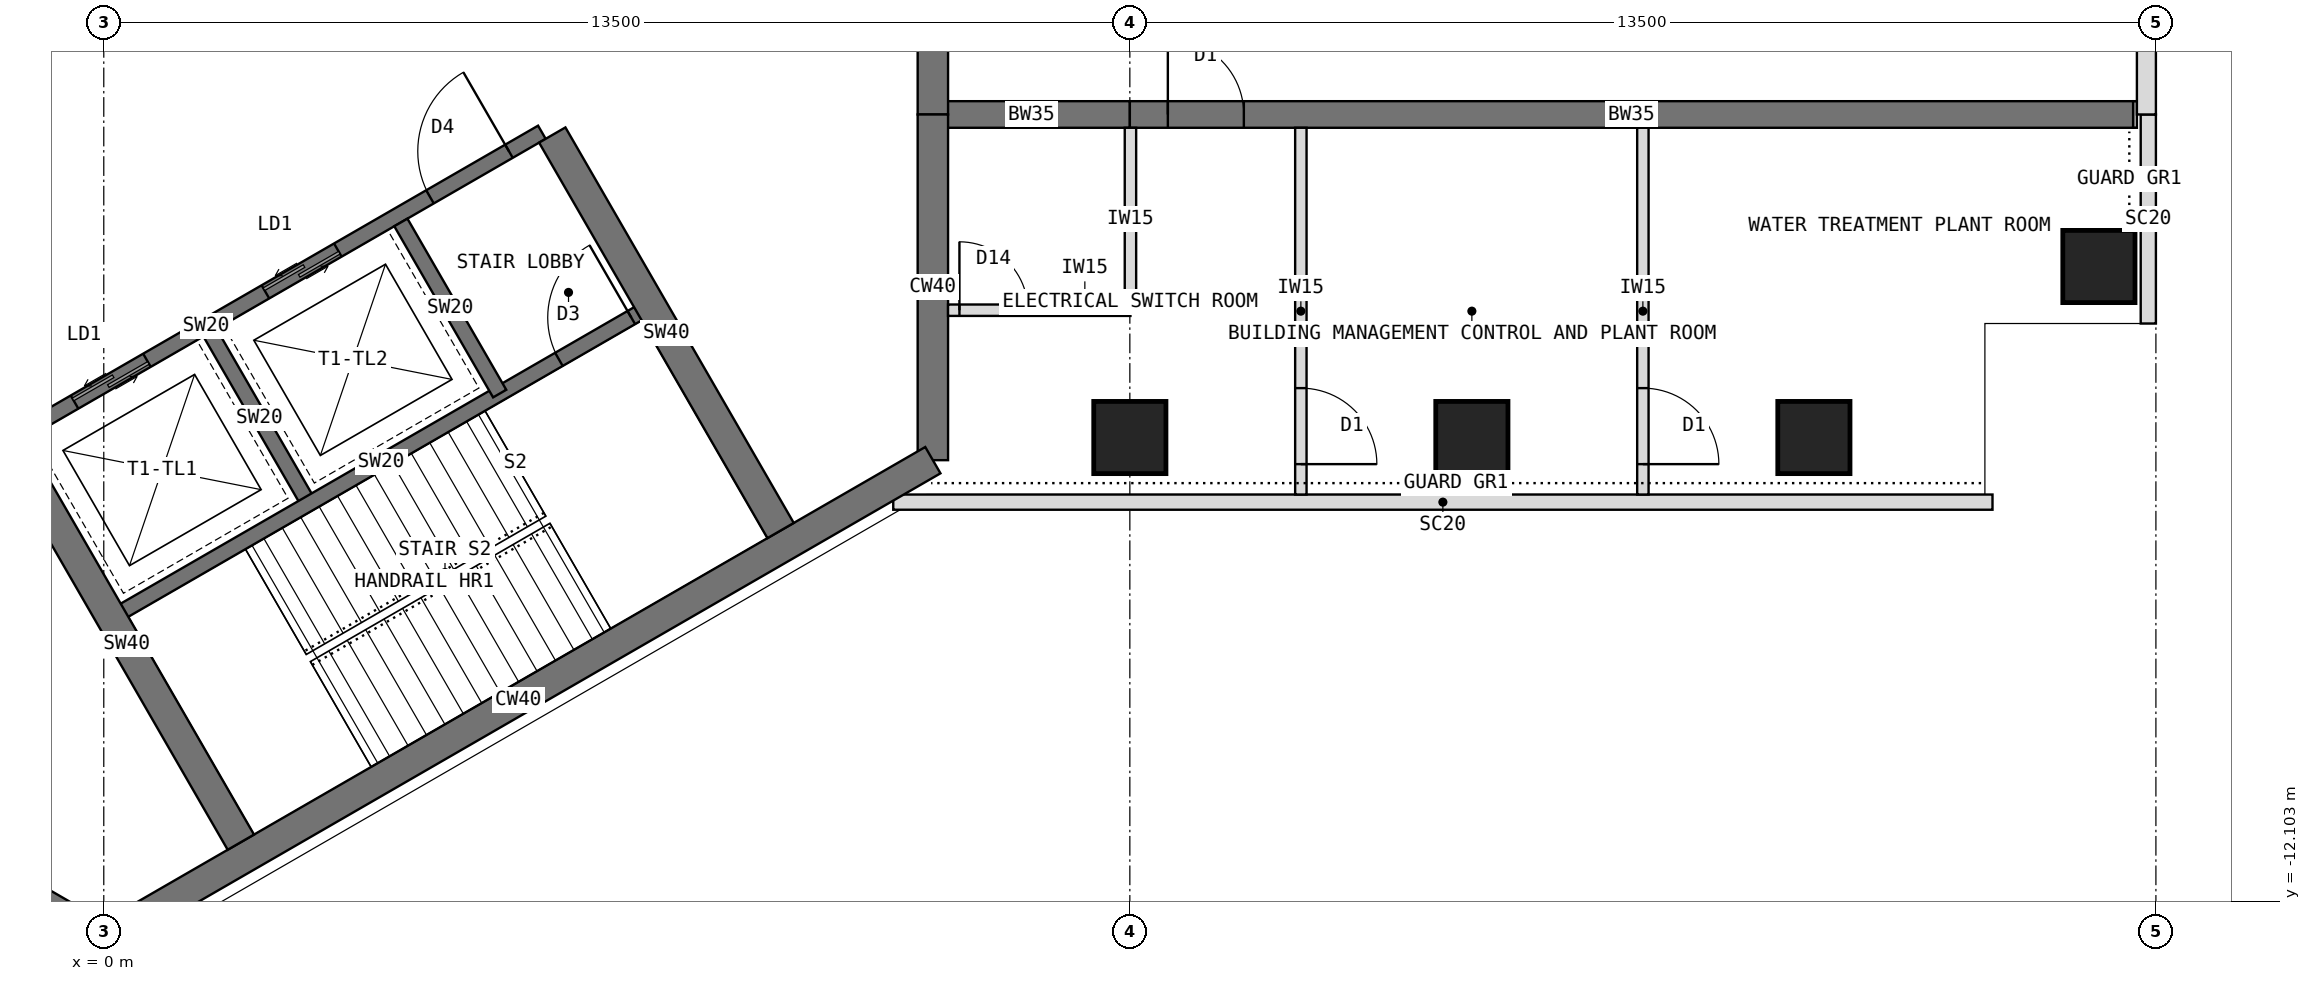
"""IFC4 building model, lengths in metres.
Left out: names, types, materials, properties, quantities, classifications, styles, units other than length and angle.
Written with IfcOpenShell. Run it as: python <this file> out.ifc"""

import sys

from ifc_helpers import new_model, si_unit, direction, frame, frame_2d, origin, origin_2d, place, context, subcontext, project, spatial, rectangle, extrude, element, fill, save


model = new_model("IFC4")
c1 = context("Model", 3, precision=1e-05, world=origin(), true_north=direction((0.0, 1.0)))
c2 = subcontext(c1, "Body", "Model", "MODEL_VIEW")
j1 = project(units=[si_unit("LENGTHUNIT", "METRE"), si_unit("PLANEANGLEUNIT", "RADIAN")], contexts=[c1])
p1 = place(None, origin())
s1 = spatial("IfcSite", under=j1, at=p1, CompositionType="ELEMENT")
p2 = place(p1, origin())
s2 = spatial("IfcBuilding", under=s1, at=p2, CompositionType="ELEMENT")
p3 = place(p2, frame((0.0, 0.0, 291.5)))
s3 = spatial("IfcBuildingStorey", under=s2, at=p3, CompositionType="ELEMENT", Elevation=291.5)
p4 = place(p3, frame((10.908, -6.298, 0.0), z_axis=(0.0, 0.0, 1.0), x_axis=(0.0, 1.0, 0.0)))
e1 = element("IfcWall", 1, at=p4, inside=s3, PredefinedType="SHEAR", context=c2, shape_type="SweptSolid", body=[
    extrude(rectangle(XDim=4.548, YDim=0.4, at=frame_2d((2.274, 0.0))), origin(), (0.0, 0.0, 1.0), 4.55),
])
p5 = place(p3, frame((10.908, -1.75, 0.0), z_axis=(0.0, 0.0, 1.0), x_axis=(0.0, 1.0, 0.0)))
e2 = element("IfcWall", 2, at=p5, inside=s3, PredefinedType="SHEAR", context=c2, shape_type="SweptSolid", body=[
    extrude(rectangle(XDim=3.5, YDim=0.4, at=frame_2d((1.75, 0.0))), origin(), (0.0, 0.0, 1.0), 4.55),
])
p6 = place(p5, frame((0.85, 0.0, 0.0)))
e3 = element("IfcOpeningElement", 3, at=p6, cuts=e2, PredefinedType="OPENING", context=c2, shape_type="SweptSolid", body=[
    extrude(rectangle(XDim=1.8, YDim=2.1, at=frame_2d((0.9, 1.05))), frame((0.0, 0.21, 0.0), z_axis=(0.0, -1.0, 0.0), x_axis=(1.0, 0.0, 0.0)), (0.0, 0.0, 1.0), 0.42),
])
p7 = place(p3, frame((-3.939, -10.322, 0.0), z_axis=(0.0, 0.0, 1.0), x_axis=(0.866011268655, -0.500024481964, 0.0)))
e4 = element("IfcWall", 4, at=p7, inside=s3, PredefinedType="SHEAR", context=c2, shape_type="SweptSolid", body=[
    extrude(rectangle(XDim=4.548, YDim=0.4, at=frame_2d((2.274, 0.0))), origin(), (0.0, 0.0, 1.0), 4.55),
])
p8 = place(p3, frame((0.0, -12.596, 0.0), z_axis=(0.0, 0.0, 1.0), x_axis=(0.866021940709, 0.500005998175, 0.0)))
e5 = element("IfcWall", 5, at=p8, inside=s3, PredefinedType="SHEAR", context=c2, shape_type="SweptSolid", body=[
    extrude(rectangle(XDim=12.596, YDim=0.4, at=frame_2d((6.298, 0.0))), origin(), (0.0, 0.0, 1.0), 4.55),
])
p9 = place(p3, frame((10.908, -1.75, 0.0), z_axis=(0.0, 0.0, 1.0), x_axis=(1.0, 0.0, 0.0)))
e6 = element("IfcWall", 6, at=p9, inside=s3, PredefinedType="SHEAR", context=c2, shape_type="SweptSolid", body=[
    extrude(rectangle(XDim=2.592, YDim=0.35, at=frame_2d((1.296, 0.0))), origin(), (0.0, 0.0, 1.0), 4.55),
])
p10 = place(p3, frame((13.5, -1.75, 0.0), z_axis=(0.0, 0.0, 1.0), x_axis=(1.0, 0.0, 0.0)))
e7 = element("IfcWall", 7, at=p10, inside=s3, PredefinedType="SHEAR", context=c2, shape_type="SweptSolid", body=[
    extrude(rectangle(XDim=13.2, YDim=0.35, at=frame_2d((6.6, 0.0))), origin(), (0.0, 0.0, 1.0), 4.55),
])
p11 = place(p10, frame((0.5, 0.0, 0.0)))
e8 = element("IfcOpeningElement", 8, at=p11, cuts=e7, PredefinedType="OPENING", context=c2, shape_type="SweptSolid", body=[
    extrude(rectangle(XDim=1.0, YDim=2.1, at=frame_2d((0.5, 1.05))), frame((0.0, 0.185, 0.0), z_axis=(0.0, -1.0, 0.0), x_axis=(1.0, 0.0, 0.0)), (0.0, 0.0, 1.0), 0.37),
])
for number, where, z_axis, x_axis in (
    (9, (13.5, -6.0, 0.0), (0.0, 0.0, 1.0), (1.0, 0.0, 0.0)),
    (10, (18.0, -6.0, 0.0), (0.0, 0.0, 1.0), (1.0, 0.0, 0.0)),
    (11, (22.5, -6.0, 0.0), (0.0, 0.0, 1.0), (1.0, 0.0, 0.0)),
    (12, (26.25, -3.75, 0.0), (0.0, 0.0, 1.0), (1.0, 0.0, 0.0)),
):
    element("IfcColumn", number, at=place(p3, frame(where, z_axis=z_axis, x_axis=x_axis)), inside=s3, PredefinedType="COLUMN", context=c2, shape_type="SweptSolid", body=[
        extrude(rectangle(XDim=0.95, YDim=0.95, at=origin_2d()), origin(), (0.0, 0.0, 1.0), 5.0),
    ])
p12 = place(p3, frame((24.85, -6.85, 0.0), z_axis=(0.0, 0.0, 1.0), x_axis=(-1.0, 0.0, 0.0)))
e13 = element("IfcWall", 13, at=p12, inside=s3, PredefinedType="USERDEFINED", context=c2, shape_type="SweptSolid", body=[
    extrude(rectangle(XDim=14.463, YDim=0.2, at=frame_2d((7.231, 0.0))), origin(), (0.0, 0.0, 1.0), 4.55),
])
p13 = place(p3, frame((26.9, -4.5, 0.0), z_axis=(0.0, 0.0, 1.0), x_axis=(0.0, 1.0, 0.0)))
e14 = element("IfcWall", 14, at=p13, inside=s3, PredefinedType="USERDEFINED", context=c2, shape_type="SweptSolid", body=[
    extrude(rectangle(XDim=2.75, YDim=0.2, at=frame_2d((1.375, 0.0))), origin(), (0.0, 0.0, 1.0), 4.55),
])
p14 = place(p3, frame((26.875, -1.75, 0.0), z_axis=(0.0, 0.0, 1.0), x_axis=(0.0, 1.0, 0.0)))
e15 = element("IfcWall", 15, at=p14, inside=s3, PredefinedType="STANDARD", context=c2, shape_type="SweptSolid", body=[
    extrude(rectangle(XDim=3.5, YDim=0.25, at=frame_2d((1.75, 0.0))), origin(), (0.0, 0.0, 1.0), 4.55),
])
p15 = place(p3, frame((26.7, -1.75, 0.0), z_axis=(0.0, 0.0, 1.0), x_axis=(1.0, 0.0, 0.0)))
e16 = element("IfcWall", 16, at=p15, inside=s3, PredefinedType="PARTITIONING", context=c2, shape_type="SweptSolid", body=[
    extrude(rectangle(XDim=0.05, YDim=0.35, at=frame_2d((0.025, 0.0))), origin(), (0.0, 0.0, 1.0), 4.55),
])
p16 = place(p3, frame((-1.164, -5.984, 0.0), z_axis=(0.0, 0.0, 1.0), x_axis=(0.866026010844, 0.49999894854, 0.0)))
e17 = element("IfcWall", 17, at=p16, inside=s3, PredefinedType="SHEAR", context=c2, shape_type="SweptSolid", body=[
    extrude(rectangle(XDim=8.0, YDim=0.2, at=frame_2d((4.0, 0.0))), origin(), (0.0, 0.0, 1.0), 4.55),
])
p17 = place(p16, frame((6.3, 0.0, 0.0)))
e18 = element("IfcOpeningElement", 18, at=p17, cuts=e17, PredefinedType="OPENING", context=c2, shape_type="SweptSolid", body=[
    extrude(rectangle(XDim=1.2, YDim=2.1, at=frame_2d((0.6, 1.05))), frame((0.0, 0.11, 0.0), z_axis=(0.0, -1.0, 0.0), x_axis=(1.0, 0.0, 0.0)), (0.0, 0.0, 1.0), 0.22),
])
p18 = place(p16, frame((0.9, 0.0, 0.0)))
e19 = element("IfcOpeningElement", 19, at=p18, cuts=e17, PredefinedType="OPENING", context=c2, shape_type="SweptSolid", body=[
    extrude(rectangle(XDim=1.1, YDim=2.2, at=frame_2d((0.55, 1.1))), frame((0.0, 0.11, 0.0), z_axis=(0.0, -1.0, 0.0), x_axis=(1.0, 0.0, 0.0)), (0.0, 0.0, 1.0), 0.22),
])
p19 = place(p16, frame((3.8, 0.0, 0.0)))
e20 = element("IfcOpeningElement", 20, at=p19, cuts=e17, PredefinedType="OPENING", context=c2, shape_type="SweptSolid", body=[
    extrude(rectangle(XDim=1.1, YDim=2.2, at=frame_2d((0.55, 1.1))), frame((0.0, 0.11, 0.0), z_axis=(0.0, -1.0, 0.0), x_axis=(1.0, 0.0, 0.0)), (0.0, 0.0, 1.0), 0.22),
])
p20 = place(p3, frame((1.397, -4.62, 0.0), z_axis=(0.0, 0.0, 1.0), x_axis=(0.499936506574, -0.866062058628, 0.0)))
e21 = element("IfcWall", 21, at=p20, inside=s3, PredefinedType="SHEAR", context=c2, shape_type="SweptSolid", body=[
    extrude(rectangle(XDim=2.6, YDim=0.2, at=frame_2d((1.3, 0.0))), origin(), (0.0, 0.0, 1.0), 4.55),
])
p21 = place(p3, frame((3.909, -3.17, 0.0), z_axis=(0.0, 0.0, 1.0), x_axis=(0.49997716683, -0.86603858612, 0.0)))
e22 = element("IfcWall", 22, at=p21, inside=s3, PredefinedType="SHEAR", context=c2, shape_type="SweptSolid", body=[
    extrude(rectangle(XDim=2.6, YDim=0.2, at=frame_2d((1.3, 0.0))), origin(), (0.0, 0.0, 1.0), 4.55),
])
p22 = place(p3, frame((0.186, -8.322, 0.0), z_axis=(0.0, 0.0, 1.0), x_axis=(0.866026010844, 0.49999894854, 0.0)))
e23 = element("IfcWall", 23, at=p22, inside=s3, PredefinedType="SHEAR", context=c2, shape_type="SweptSolid", body=[
    extrude(rectangle(XDim=8.0, YDim=0.2, at=frame_2d((4.0, 0.0))), origin(), (0.0, 0.0, 1.0), 4.55),
])
p23 = place(p22, frame((6.7, 0.0, 0.0)))
e24 = element("IfcOpeningElement", 24, at=p23, cuts=e23, PredefinedType="OPENING", context=c2, shape_type="SweptSolid", body=[
    extrude(rectangle(XDim=1.1, YDim=2.1, at=frame_2d((0.55, 1.05))), frame((0.0, 0.11, 0.0), z_axis=(0.0, -1.0, 0.0), x_axis=(1.0, 0.0, 0.0)), (0.0, 0.0, 1.0), 0.22),
])
for number, where, z_axis, x_axis in (
    (25, (5.901, -2.02, 0.0), (0.0, 0.0, 1.0), (0.5, -0.866, 0.0)),
    (26, (-1.201, -6.12, 0.0), (0.0, 0.0, 1.0), (0.5, -0.866, 0.0)),
):
    element("IfcWall", number, at=place(p3, frame(where, z_axis=z_axis, x_axis=x_axis)), inside=s3, PredefinedType="SHEAR", context=c2, shape_type="SweptSolid", body=[
        extrude(rectangle(XDim=6.008, YDim=0.4, at=frame_2d((3.004, 0.0))), origin(), (0.0, 0.0, 1.0), 4.55),
    ])
p24 = place(p3, frame((15.75, -1.925, 0.0), z_axis=(0.0, 0.0, 1.0), x_axis=(0.0, -1.0, 0.0)))
e27 = element("IfcWall", 27, at=p24, inside=s3, PredefinedType="PARTITIONING", context=c2, shape_type="SweptSolid", body=[
    extrude(rectangle(XDim=4.825, YDim=0.15, at=frame_2d((2.413, 0.0))), origin(), (0.0, 0.0, 1.0), 4.55),
])
p25 = place(p24, frame((3.425, 0.0, 0.0)))
e28 = element("IfcOpeningElement", 28, at=p25, cuts=e27, PredefinedType="OPENING", context=c2, shape_type="SweptSolid", body=[
    extrude(rectangle(XDim=1.0, YDim=2.1, at=frame_2d((0.5, 1.05))), frame((0.0, 0.085, 0.0), z_axis=(0.0, -1.0, 0.0), x_axis=(1.0, 0.0, 0.0)), (0.0, 0.0, 1.0), 0.17),
])
p26 = place(p3, frame((20.25, -1.925, 0.0), z_axis=(0.0, 0.0, 1.0), x_axis=(0.0, -1.0, 0.0)))
e29 = element("IfcWall", 29, at=p26, inside=s3, PredefinedType="PARTITIONING", context=c2, shape_type="SweptSolid", body=[
    extrude(rectangle(XDim=4.825, YDim=0.15, at=frame_2d((2.413, 0.0))), origin(), (0.0, 0.0, 1.0), 4.55),
])
p27 = place(p26, frame((3.425, 0.0, 0.0)))
e30 = element("IfcOpeningElement", 30, at=p27, cuts=e29, PredefinedType="OPENING", context=c2, shape_type="SweptSolid", body=[
    extrude(rectangle(XDim=1.0, YDim=2.1, at=frame_2d((0.5, 1.05))), frame((0.0, 0.085, 0.0), z_axis=(0.0, -1.0, 0.0), x_axis=(1.0, 0.0, 0.0)), (0.0, 0.0, 1.0), 0.17),
])
p28 = place(p3, frame((11.108, -4.325, 0.0), z_axis=(0.0, 0.0, 1.0), x_axis=(1.0, 0.0, 0.0)))
e31 = element("IfcWall", 31, at=p28, inside=s3, PredefinedType="PARTITIONING", context=c2, shape_type="SweptSolid", body=[
    extrude(rectangle(XDim=2.4, YDim=0.15, at=frame_2d((1.2, 0.0))), origin(), (0.0, 0.0, 1.0), 4.55),
])
p29 = place(p28, frame((0.15, 0.0, 0.0)))
e32 = element("IfcOpeningElement", 32, at=p29, cuts=e31, PredefinedType="OPENING", context=c2, shape_type="SweptSolid", body=[
    extrude(rectangle(XDim=0.9, YDim=2.1, at=frame_2d((0.45, 1.05))), frame((0.0, 0.085, 0.0), z_axis=(0.0, -1.0, 0.0), x_axis=(1.0, 0.0, 0.0)), (0.0, 0.0, 1.0), 0.17),
])
p30 = place(p3, frame((13.508, -1.925, 0.0), z_axis=(0.0, 0.0, 1.0), x_axis=(0.0, -1.0, 0.0)))
e33 = element("IfcWall", 33, at=p30, inside=s3, PredefinedType="PARTITIONING", context=c2, shape_type="SweptSolid", body=[
    extrude(rectangle(XDim=2.4, YDim=0.15, at=frame_2d((1.2, 0.0))), origin(), (0.0, 0.0, 1.0), 4.017),
])
p31 = place(p17, origin())
e34 = element("IfcDoor", 34, at=p31, inside=s3, OperationType="SINGLE_SWING_RIGHT", PredefinedType="DOOR", context=c2, shape_type="SweptSolid", body=[
    extrude(rectangle(XDim=1.2, YDim=2.1, at=frame_2d((0.6, 1.05))), frame((0.0, 0.025, 0.0), z_axis=(0.0, -1.0, 0.0), x_axis=(1.0, 0.0, 0.0)), (0.0, 0.0, 1.0), 0.05),
])
fill(e18, e34)
p32 = place(p18, origin())
e35 = element("IfcDoor", 35, at=p32, inside=s3, OperationType="DOUBLE_DOOR_SLIDING", PredefinedType="DOOR", context=c2, shape_type="SweptSolid", body=[
    extrude(rectangle(XDim=1.1, YDim=2.2, at=frame_2d((0.55, 1.1))), frame((0.0, 0.025, 0.0), z_axis=(0.0, -1.0, 0.0), x_axis=(1.0, 0.0, 0.0)), (0.0, 0.0, 1.0), 0.05),
])
fill(e19, e35)
p33 = place(p19, origin())
e36 = element("IfcDoor", 36, at=p33, inside=s3, OperationType="DOUBLE_DOOR_SLIDING", PredefinedType="DOOR", context=c2, shape_type="SweptSolid", body=[
    extrude(rectangle(XDim=1.1, YDim=2.2, at=frame_2d((0.55, 1.1))), frame((0.0, 0.025, 0.0), z_axis=(0.0, -1.0, 0.0), x_axis=(1.0, 0.0, 0.0)), (0.0, 0.0, 1.0), 0.05),
])
fill(e20, e36)
p34 = place(p23, origin())
e37 = element("IfcDoor", 37, at=p34, inside=s3, OperationType="SINGLE_SWING_RIGHT", PredefinedType="DOOR", context=c2, shape_type="SweptSolid", body=[
    extrude(rectangle(XDim=1.1, YDim=2.1, at=frame_2d((0.55, 1.05))), frame((0.0, 0.025, 0.0), z_axis=(0.0, -1.0, 0.0), x_axis=(1.0, 0.0, 0.0)), (0.0, 0.0, 1.0), 0.05),
])
fill(e24, e37)
p35 = place(p25, origin())
e38 = element("IfcDoor", 38, at=p35, inside=s3, OperationType="SINGLE_SWING_RIGHT", PredefinedType="DOOR", context=c2, shape_type="SweptSolid", body=[
    extrude(rectangle(XDim=1.0, YDim=2.1, at=frame_2d((0.5, 1.05))), frame((0.0, 0.025, 0.0), z_axis=(0.0, -1.0, 0.0), x_axis=(1.0, 0.0, 0.0)), (0.0, 0.0, 1.0), 0.05),
])
fill(e28, e38)
p36 = place(p27, origin())
e39 = element("IfcDoor", 39, at=p36, inside=s3, OperationType="SINGLE_SWING_RIGHT", PredefinedType="DOOR", context=c2, shape_type="SweptSolid", body=[
    extrude(rectangle(XDim=1.0, YDim=2.1, at=frame_2d((0.5, 1.05))), frame((0.0, 0.025, 0.0), z_axis=(0.0, -1.0, 0.0), x_axis=(1.0, 0.0, 0.0)), (0.0, 0.0, 1.0), 0.05),
])
fill(e30, e39)
p37 = place(p29, origin())
e40 = element("IfcDoor", 40, at=p37, inside=s3, OperationType="SINGLE_SWING_LEFT", PredefinedType="DOOR", context=c2, shape_type="SweptSolid", body=[
    extrude(rectangle(XDim=0.9, YDim=2.1, at=frame_2d((0.45, 1.05))), frame((0.0, 0.025, 0.0), z_axis=(0.0, -1.0, 0.0), x_axis=(1.0, 0.0, 0.0)), (0.0, 0.0, 1.0), 0.05),
])
fill(e32, e40)
p38 = place(p11, origin())
e41 = element("IfcDoor", 41, at=p38, inside=s3, OperationType="SINGLE_SWING_LEFT", PredefinedType="DOOR", context=c2, shape_type="SweptSolid", body=[
    extrude(rectangle(XDim=1.0, YDim=2.1, at=frame_2d((0.5, 1.05))), frame((0.0, 0.025, 0.0), z_axis=(0.0, -1.0, 0.0), x_axis=(1.0, 0.0, 0.0)), (0.0, 0.0, 1.0), 0.05),
])
fill(e8, e41)
save(model, sys.argv[1])
